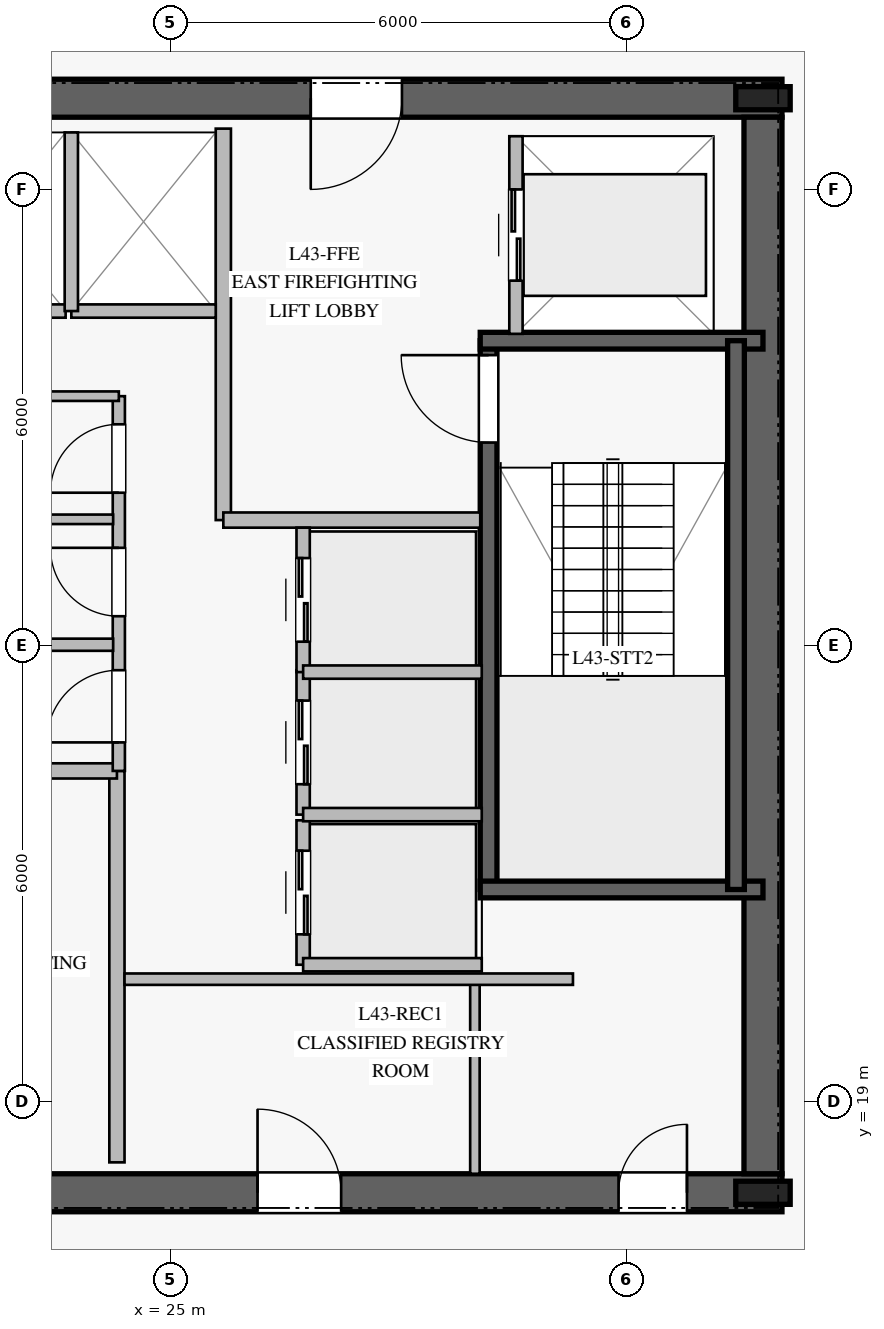
"""IFC4 building model, lengths in metres.
Left out: names, types, materials, properties, quantities, classifications, styles, units other than length and angle.
Written with IfcOpenShell. Run it as: python <this file> out.ifc"""

import sys

from ifc_helpers import new_model, si_unit, direction, frame, frame_2d, origin, origin_2d, place, context, subcontext, project, spatial, rectangle, i_section, extrude, element, fill, save


model = new_model("IFC4")
c1 = context("Model", 3, precision=1e-05, world=origin(), true_north=direction((0.0, 1.0)))
c2 = subcontext(c1, "Body", "Model", "MODEL_VIEW")
j1 = project(units=[si_unit("LENGTHUNIT", "METRE"), si_unit("PLANEANGLEUNIT", "RADIAN")], contexts=[c1])
p1 = place(None, origin())
s1 = spatial("IfcSite", under=j1, at=p1, CompositionType="ELEMENT")
p2 = place(p1, origin())
s2 = spatial("IfcBuilding", under=s1, at=p2, CompositionType="ELEMENT")
p3 = place(p2, frame((0.0, 0.0, 180.8)))
s3 = spatial("IfcBuildingStorey", under=s2, at=p3, CompositionType="ELEMENT", Elevation=180.8)
p4 = place(p3, frame((16.95, 17.8, 0.0), z_axis=(0.0, 0.0, 1.0), x_axis=(1.0, 0.0, 0.0)))
e1 = element("IfcWall", 1, at=p4, inside=s3, PredefinedType="SHEAR", context=c2, shape_type="SweptSolid", body=[
    extrude(rectangle(XDim=16.1, YDim=0.5, at=frame_2d((8.05, 0.0))), origin(), (0.0, 0.0, 1.0), 3.78),
])
p5 = place(p4, frame((5.0, 0.0, 0.0)))
e2 = element("IfcOpeningElement", 2, at=p5, cuts=e1, PredefinedType="OPENING", context=c2, shape_type="SweptSolid", body=[
    extrude(rectangle(XDim=1.2, YDim=2.25, at=frame_2d((0.6, 1.125))), frame((0.0, 0.26, 0.0), z_axis=(0.0, -1.0, 0.0), x_axis=(1.0, 0.0, 0.0)), (0.0, 0.0, 1.0), 0.52),
])
p6 = place(p4, frame((13.95, 0.0, 0.0)))
e3 = element("IfcOpeningElement", 3, at=p6, cuts=e1, PredefinedType="OPENING", context=c2, shape_type="SweptSolid", body=[
    extrude(rectangle(XDim=0.9, YDim=2.1, at=frame_2d((0.45, 1.05))), frame((0.0, 0.26, 0.0), z_axis=(0.0, -1.0, 0.0), x_axis=(1.0, 0.0, 0.0)), (0.0, 0.0, 1.0), 0.52),
])
p7 = place(p4, frame((9.2, 0.0, 0.0)))
e4 = element("IfcOpeningElement", 4, at=p7, cuts=e1, PredefinedType="OPENING", context=c2, shape_type="SweptSolid", body=[
    extrude(rectangle(XDim=1.1, YDim=2.2, at=frame_2d((0.55, 1.1))), frame((0.0, 0.26, 0.0), z_axis=(0.0, -1.0, 0.0), x_axis=(1.0, 0.0, 0.0)), (0.0, 0.0, 1.0), 0.52),
])
p8 = place(p3, frame((33.05, 32.2, 0.0), z_axis=(0.0, 0.0, 1.0), x_axis=(-1.0, 0.0, 0.0)))
e5 = element("IfcWall", 5, at=p8, inside=s3, PredefinedType="SHEAR", context=c2, shape_type="SweptSolid", body=[
    extrude(rectangle(XDim=16.1, YDim=0.5, at=frame_2d((8.05, 0.0))), origin(), (0.0, 0.0, 1.0), 3.78),
])
p9 = place(p8, frame((5.0, 0.0, 0.0)))
e6 = element("IfcOpeningElement", 6, at=p9, cuts=e5, PredefinedType="OPENING", context=c2, shape_type="SweptSolid", body=[
    extrude(rectangle(XDim=1.2, YDim=2.25, at=frame_2d((0.6, 1.125))), frame((0.0, 0.26, 0.0), z_axis=(0.0, -1.0, 0.0), x_axis=(1.0, 0.0, 0.0)), (0.0, 0.0, 1.0), 0.52),
])
p10 = place(p3, frame((32.8, 18.05, 0.0), z_axis=(0.0, 0.0, 1.0), x_axis=(0.0, 1.0, 0.0)))
e7 = element("IfcWall", 7, at=p10, inside=s3, PredefinedType="SHEAR", context=c2, shape_type="SweptSolid", body=[
    extrude(rectangle(XDim=13.9, YDim=0.5, at=frame_2d((6.95, 0.0))), origin(), (0.0, 0.0, 1.0), 3.78),
])
for number, where, z_axis, x_axis in (
    (8, (32.8, 17.8, 0.0), (0.0, 0.0, 1.0), (1.0, 0.0, 0.0)),
    (9, (32.8, 32.2, 0.0), (0.0, 0.0, 1.0), (1.0, 0.0, 0.0)),
):
    element("IfcColumn", number, at=place(p3, frame(where, z_axis=z_axis, x_axis=x_axis)), inside=s3, PredefinedType="COLUMN", context=c2, shape_type="SweptSolid", body=[
        extrude(i_section(OverallWidth=0.304, OverallDepth=0.716, WebThickness=0.021, FlangeThickness=0.04, at=origin_2d()), origin(), (0.0, 0.0, 1.0), 4.0),
    ])
p11 = place(p3, frame((29.19, 21.79, 0.0), z_axis=(0.0, 0.0, 1.0), x_axis=(0.0, 1.0, 0.0)))
e10 = element("IfcWall", 10, at=p11, inside=s3, PredefinedType="SOLIDWALL", context=c2, shape_type="SweptSolid", body=[
    extrude(rectangle(XDim=7.22, YDim=0.22, at=frame_2d((3.61, 0.0))), origin(), (0.0, 0.0, 1.0), 3.78),
])
p12 = place(p11, frame((5.88, 0.0, 0.0)))
e11 = element("IfcOpeningElement", 11, at=p12, cuts=e10, PredefinedType="OPENING", context=c2, shape_type="SweptSolid", body=[
    extrude(rectangle(XDim=1.15, YDim=2.2, at=frame_2d((0.575, 1.1))), frame((0.0, 0.12, 0.0), z_axis=(0.0, -1.0, 0.0), x_axis=(1.0, 0.0, 0.0)), (0.0, 0.0, 1.0), 0.24),
])
for number, where, z_axis, x_axis in (
    (12, (29.08, 21.79, 0.0), (0.0, 0.0, 1.0), (1.0, 0.0, 0.0)),
    (13, (29.08, 29.01, 0.0), (0.0, 0.0, 1.0), (1.0, 0.0, 0.0)),
):
    element("IfcWall", number, at=place(p3, frame(where, z_axis=z_axis, x_axis=x_axis)), inside=s3, PredefinedType="SOLIDWALL", context=c2, shape_type="SweptSolid", body=[
        extrude(rectangle(XDim=3.72, YDim=0.22, at=frame_2d((1.86, 0.0))), origin(), (0.0, 0.0, 1.0), 3.78),
    ])
p13 = place(p3, frame((32.445, 29.01, 0.0), z_axis=(0.0, 0.0, 1.0), x_axis=(0.0, -1.0, 0.0)))
e14 = element("IfcWall", 14, at=p13, inside=s3, PredefinedType="SOLIDWALL", context=c2, shape_type="SweptSolid", body=[
    extrude(rectangle(XDim=7.22, YDim=0.22, at=frame_2d((3.61, 0.0))), origin(), (0.0, 0.0, 1.0), 3.78),
])
p14 = place(p3, frame((24.3, 18.2, 0.0), z_axis=(0.0, 0.0, 1.0), x_axis=(0.0, 1.0, 0.0)))
e15 = element("IfcWall", 15, at=p14, inside=s3, PredefinedType="PARTITIONING", context=c2, shape_type="SweptSolid", body=[
    extrude(rectangle(XDim=5.15, YDim=0.2, at=frame_2d((2.575, 0.0))), origin(), (0.0, 0.0, 1.0), 3.78),
])
p15 = place(p3, frame((20.92, 23.35, 0.0), z_axis=(0.0, 0.0, 1.0), x_axis=(1.0, 0.0, 0.0)))
e16 = element("IfcWall", 16, at=p15, inside=s3, PredefinedType="PARTITIONING", context=c2, shape_type="SweptSolid", body=[
    extrude(rectangle(XDim=3.38, YDim=0.2, at=frame_2d((1.69, 0.0))), origin(), (0.0, 0.0, 1.0), 3.78),
])
p16 = place(p3, frame((25.7, 26.65, 0.0), z_axis=(0.0, 0.0, 1.0), x_axis=(0.0, 1.0, 0.0)))
e17 = element("IfcWall", 17, at=p16, inside=s3, PredefinedType="PARTITIONING", context=c2, shape_type="SweptSolid", body=[
    extrude(rectangle(XDim=5.15, YDim=0.2, at=frame_2d((2.575, 0.0))), origin(), (0.0, 0.0, 1.0), 3.78),
])
p17 = place(p3, frame((25.7, 26.65, 0.0), z_axis=(0.0, 0.0, 1.0), x_axis=(1.0, 0.0, 0.0)))
e18 = element("IfcWall", 18, at=p17, inside=s3, PredefinedType="PARTITIONING", context=c2, shape_type="SweptSolid", body=[
    extrude(rectangle(XDim=3.38, YDim=0.2, at=frame_2d((1.69, 0.0))), origin(), (0.0, 0.0, 1.0), 3.78),
])
p18 = place(p3, frame((24.325, 23.35, 0.0), z_axis=(0.0, 0.0, 1.0), x_axis=(0.0, 1.0, 0.0)))
e19 = element("IfcWall", 19, at=p18, inside=s3, PredefinedType="PLUMBINGWALL", context=c2, shape_type="SweptSolid", body=[
    extrude(rectangle(XDim=4.93, YDim=0.16, at=frame_2d((2.465, 0.0))), origin(), (0.0, 0.0, 1.0), 3.78),
])
p19 = place(p18, frame((0.375, 0.0, 0.0)))
e20 = element("IfcOpeningElement", 20, at=p19, cuts=e19, PredefinedType="OPENING", context=c2, shape_type="SweptSolid", body=[
    extrude(rectangle(XDim=0.95, YDim=2.1, at=frame_2d((0.475, 1.05))), frame((0.0, 0.09, 0.0), z_axis=(0.0, -1.0, 0.0), x_axis=(1.0, 0.0, 0.0)), (0.0, 0.0, 1.0), 0.18),
])
p20 = place(p18, frame((2.035, 0.0, 0.0)))
e21 = element("IfcOpeningElement", 21, at=p20, cuts=e19, PredefinedType="OPENING", context=c2, shape_type="SweptSolid", body=[
    extrude(rectangle(XDim=0.9, YDim=2.1, at=frame_2d((0.45, 1.05))), frame((0.0, 0.09, 0.0), z_axis=(0.0, -1.0, 0.0), x_axis=(1.0, 0.0, 0.0)), (0.0, 0.0, 1.0), 0.18),
])
p21 = place(p18, frame((3.66, 0.0, 0.0)))
e22 = element("IfcOpeningElement", 22, at=p21, cuts=e19, PredefinedType="OPENING", context=c2, shape_type="SweptSolid", body=[
    extrude(rectangle(XDim=0.9, YDim=2.1, at=frame_2d((0.45, 1.05))), frame((0.0, 0.09, 0.0), z_axis=(0.0, -1.0, 0.0), x_axis=(1.0, 0.0, 0.0)), (0.0, 0.0, 1.0), 0.18),
])
p22 = place(p3, frame((20.92, 28.28, 0.0), z_axis=(0.0, 0.0, 1.0), x_axis=(1.0, 0.0, 0.0)))
e23 = element("IfcWall", 23, at=p22, inside=s3, PredefinedType="PARTITIONING", context=c2, shape_type="SweptSolid", body=[
    extrude(rectangle(XDim=3.405, YDim=0.125, at=frame_2d((1.703, 0.0))), origin(), (0.0, 0.0, 1.0), 3.78),
])
p23 = place(p3, frame((29.01, 18.05, 0.0), z_axis=(0.0, 0.0, 1.0), x_axis=(0.0, 1.0, 0.0)))
e24 = element("IfcWall", 24, at=p23, inside=s3, PredefinedType="PARTITIONING", context=c2, shape_type="SweptSolid", body=[
    extrude(rectangle(XDim=2.5, YDim=0.125, at=frame_2d((1.25, 0.0))), origin(), (0.0, 0.0, 1.0), 3.08),
])
p24 = place(p3, frame((20.95, 25.01, 0.0), z_axis=(0.0, 0.0, 1.0), x_axis=(1.0, 0.0, 0.0)))
e25 = element("IfcWall", 25, at=p24, inside=s3, PredefinedType="PLUMBINGWALL", context=c2, shape_type="SweptSolid", body=[
    extrude(rectangle(XDim=3.3, YDim=0.16, at=frame_2d((1.65, 0.0))), origin(), (0.0, 0.0, 1.0), 3.78),
])
p25 = place(p3, frame((20.95, 26.66, 0.0), z_axis=(0.0, 0.0, 1.0), x_axis=(1.0, 0.0, 0.0)))
e26 = element("IfcWall", 26, at=p25, inside=s3, PredefinedType="PARTITIONING", context=c2, shape_type="SweptSolid", body=[
    extrude(rectangle(XDim=3.3, YDim=0.125, at=frame_2d((1.65, 0.0))), origin(), (0.0, 0.0, 1.0), 3.78),
])
p26 = place(p3, frame((24.4, 20.61, 0.0), z_axis=(0.0, 0.0, 1.0), x_axis=(1.0, 0.0, 0.0)))
e27 = element("IfcWall", 27, at=p26, inside=s3, PredefinedType="PARTITIONING", context=c2, shape_type="SweptSolid", body=[
    extrude(rectangle(XDim=5.9, YDim=0.15, at=frame_2d((2.95, 0.0))), origin(), (0.0, 0.0, 1.0), 3.78),
])
p27 = place(p3, frame((21.725, 29.4, 0.0), z_axis=(0.0, 0.0, 1.0), x_axis=(1.0, 0.0, 0.0)))
e28 = element("IfcWall", 28, at=p27, inside=s3, PredefinedType="PARTITIONING", context=c2, shape_type="SweptSolid", body=[
    extrude(rectangle(XDim=1.9, YDim=0.175, at=frame_2d((0.95, 0.0))), origin(), (0.0, 0.0, 1.0), 3.78),
])
p28 = place(p3, frame((23.7, 29.4, 0.0), z_axis=(0.0, 0.0, 1.0), x_axis=(1.0, 0.0, 0.0)))
e29 = element("IfcWall", 29, at=p28, inside=s3, PredefinedType="PARTITIONING", context=c2, shape_type="SweptSolid", body=[
    extrude(rectangle(XDim=1.9, YDim=0.175, at=frame_2d((0.95, 0.0))), origin(), (0.0, 0.0, 1.0), 3.78),
])
p29 = place(p3, frame((23.7, 29.4, 0.0), z_axis=(0.0, 0.0, 1.0), x_axis=(0.0, 1.0, 0.0)))
e30 = element("IfcWall", 30, at=p29, inside=s3, PredefinedType="PARTITIONING", context=c2, shape_type="SweptSolid", body=[
    extrude(rectangle(XDim=2.35, YDim=0.175, at=frame_2d((1.175, 0.0))), origin(), (0.0, 0.0, 1.0), 3.78),
])
p30 = place(p3, frame((26.75, 20.8, 0.0), z_axis=(0.0, 0.0, 1.0), x_axis=(0.0, 1.0, 0.0)))
e31 = element("IfcWall", 31, at=p30, inside=s3, PredefinedType="PARTITIONING", context=c2, shape_type="SweptSolid", body=[
    extrude(rectangle(XDim=1.9, YDim=0.175, at=frame_2d((0.95, 0.0))), origin(), (0.0, 0.0, 1.0), 3.78),
])
p31 = place(p30, frame((0.4, 0.0, 0.0)))
e32 = element("IfcOpeningElement", 32, at=p31, cuts=e31, PredefinedType="OPENING", context=c2, shape_type="SweptSolid", body=[
    extrude(rectangle(XDim=1.1, YDim=2.2, at=frame_2d((0.55, 1.1))), frame((0.0, 0.098, 0.0), z_axis=(0.0, -1.0, 0.0), x_axis=(1.0, 0.0, 0.0)), (0.0, 0.0, 1.0), 0.195),
])
p32 = place(p3, frame((26.75, 20.8, 0.0), z_axis=(0.0, 0.0, 1.0), x_axis=(1.0, 0.0, 0.0)))
e33 = element("IfcWall", 33, at=p32, inside=s3, PredefinedType="PARTITIONING", context=c2, shape_type="SweptSolid", body=[
    extrude(rectangle(XDim=2.35, YDim=0.175, at=frame_2d((1.175, 0.0))), origin(), (0.0, 0.0, 1.0), 3.78),
])
p33 = place(p3, frame((26.75, 22.775, 0.0), z_axis=(0.0, 0.0, 1.0), x_axis=(0.0, 1.0, 0.0)))
e34 = element("IfcWall", 34, at=p33, inside=s3, PredefinedType="PARTITIONING", context=c2, shape_type="SweptSolid", body=[
    extrude(rectangle(XDim=1.9, YDim=0.175, at=frame_2d((0.95, 0.0))), origin(), (0.0, 0.0, 1.0), 3.78),
])
p34 = place(p33, frame((0.4, 0.0, 0.0)))
e35 = element("IfcOpeningElement", 35, at=p34, cuts=e34, PredefinedType="OPENING", context=c2, shape_type="SweptSolid", body=[
    extrude(rectangle(XDim=1.1, YDim=2.2, at=frame_2d((0.55, 1.1))), frame((0.0, 0.098, 0.0), z_axis=(0.0, -1.0, 0.0), x_axis=(1.0, 0.0, 0.0)), (0.0, 0.0, 1.0), 0.195),
])
p35 = place(p3, frame((26.75, 22.775, 0.0), z_axis=(0.0, 0.0, 1.0), x_axis=(1.0, 0.0, 0.0)))
e36 = element("IfcWall", 36, at=p35, inside=s3, PredefinedType="PARTITIONING", context=c2, shape_type="SweptSolid", body=[
    extrude(rectangle(XDim=2.35, YDim=0.175, at=frame_2d((1.175, 0.0))), origin(), (0.0, 0.0, 1.0), 3.78),
])
p36 = place(p3, frame((26.75, 24.65, 0.0), z_axis=(0.0, 0.0, 1.0), x_axis=(0.0, 1.0, 0.0)))
e37 = element("IfcWall", 37, at=p36, inside=s3, PredefinedType="PARTITIONING", context=c2, shape_type="SweptSolid", body=[
    extrude(rectangle(XDim=1.9, YDim=0.175, at=frame_2d((0.95, 0.0))), origin(), (0.0, 0.0, 1.0), 3.78),
])
p37 = place(p36, frame((0.4, 0.0, 0.0)))
e38 = element("IfcOpeningElement", 38, at=p37, cuts=e37, PredefinedType="OPENING", context=c2, shape_type="SweptSolid", body=[
    extrude(rectangle(XDim=1.1, YDim=2.2, at=frame_2d((0.55, 1.1))), frame((0.0, 0.098, 0.0), z_axis=(0.0, -1.0, 0.0), x_axis=(1.0, 0.0, 0.0)), (0.0, 0.0, 1.0), 0.195),
])
p38 = place(p3, frame((26.75, 24.65, 0.0), z_axis=(0.0, 0.0, 1.0), x_axis=(1.0, 0.0, 0.0)))
e39 = element("IfcWall", 39, at=p38, inside=s3, PredefinedType="PARTITIONING", context=c2, shape_type="SweptSolid", body=[
    extrude(rectangle(XDim=2.35, YDim=0.175, at=frame_2d((1.175, 0.0))), origin(), (0.0, 0.0, 1.0), 3.78),
])
p39 = place(p3, frame((29.55, 29.1, 0.0), z_axis=(0.0, 0.0, 1.0), x_axis=(0.0, 1.0, 0.0)))
e40 = element("IfcWall", 40, at=p39, inside=s3, PredefinedType="PARTITIONING", context=c2, shape_type="SweptSolid", body=[
    extrude(rectangle(XDim=2.6, YDim=0.175, at=frame_2d((1.3, 0.0))), origin(), (0.0, 0.0, 1.0), 3.78),
])
p40 = place(p39, frame((0.7, 0.0, 0.0)))
e41 = element("IfcOpeningElement", 41, at=p40, cuts=e40, PredefinedType="OPENING", context=c2, shape_type="SweptSolid", body=[
    extrude(rectangle(XDim=1.2, YDim=2.2, at=frame_2d((0.6, 1.1))), frame((0.0, 0.098, 0.0), z_axis=(0.0, -1.0, 0.0), x_axis=(1.0, 0.0, 0.0)), (0.0, 0.0, 1.0), 0.195),
])
p41 = place(p12, origin())
e42 = element("IfcDoor", 42, at=p41, inside=s3, OperationType="SINGLE_SWING_RIGHT", PredefinedType="DOOR", context=c2, shape_type="SweptSolid", body=[
    extrude(rectangle(XDim=1.15, YDim=2.2, at=frame_2d((0.575, 1.1))), frame((0.0, 0.025, 0.0), z_axis=(0.0, -1.0, 0.0), x_axis=(1.0, 0.0, 0.0)), (0.0, 0.0, 1.0), 0.05),
])
fill(e11, e42)
p42 = place(p9, origin())
e43 = element("IfcDoor", 43, at=p42, inside=s3, OperationType="SINGLE_SWING_RIGHT", PredefinedType="DOOR", context=c2, shape_type="SweptSolid", body=[
    extrude(rectangle(XDim=1.2, YDim=2.25, at=frame_2d((0.6, 1.125))), frame((0.0, 0.025, 0.0), z_axis=(0.0, -1.0, 0.0), x_axis=(1.0, 0.0, 0.0)), (0.0, 0.0, 1.0), 0.05),
])
fill(e6, e43)
p43 = place(p19, origin())
e44 = element("IfcDoor", 44, at=p43, inside=s3, OperationType="SINGLE_SWING_LEFT", PredefinedType="DOOR", context=c2, shape_type="SweptSolid", body=[
    extrude(rectangle(XDim=0.95, YDim=2.1, at=frame_2d((0.475, 1.05))), frame((0.0, 0.025, 0.0), z_axis=(0.0, -1.0, 0.0), x_axis=(1.0, 0.0, 0.0)), (0.0, 0.0, 1.0), 0.05),
])
fill(e20, e44)
p44 = place(p20, origin())
e45 = element("IfcDoor", 45, at=p44, inside=s3, OperationType="SINGLE_SWING_RIGHT", PredefinedType="DOOR", context=c2, shape_type="SweptSolid", body=[
    extrude(rectangle(XDim=0.9, YDim=2.1, at=frame_2d((0.45, 1.05))), frame((0.0, 0.025, 0.0), z_axis=(0.0, -1.0, 0.0), x_axis=(1.0, 0.0, 0.0)), (0.0, 0.0, 1.0), 0.05),
])
fill(e21, e45)
p45 = place(p21, origin())
e46 = element("IfcDoor", 46, at=p45, inside=s3, OperationType="SINGLE_SWING_LEFT", PredefinedType="DOOR", context=c2, shape_type="SweptSolid", body=[
    extrude(rectangle(XDim=0.9, YDim=2.1, at=frame_2d((0.45, 1.05))), frame((0.0, 0.025, 0.0), z_axis=(0.0, -1.0, 0.0), x_axis=(1.0, 0.0, 0.0)), (0.0, 0.0, 1.0), 0.05),
])
fill(e22, e46)
p46 = place(p6, origin())
e47 = element("IfcDoor", 47, at=p46, inside=s3, OperationType="SINGLE_SWING_RIGHT", PredefinedType="DOOR", context=c2, shape_type="SweptSolid", body=[
    extrude(rectangle(XDim=0.9, YDim=2.1, at=frame_2d((0.45, 1.05))), frame((0.0, 0.025, 0.0), z_axis=(0.0, -1.0, 0.0), x_axis=(1.0, 0.0, 0.0)), (0.0, 0.0, 1.0), 0.05),
])
fill(e3, e47)
p47 = place(p7, origin())
e48 = element("IfcDoor", 48, at=p47, inside=s3, OperationType="SINGLE_SWING_LEFT", PredefinedType="DOOR", context=c2, shape_type="SweptSolid", body=[
    extrude(rectangle(XDim=1.1, YDim=2.2, at=frame_2d((0.55, 1.1))), frame((0.0, 0.025, 0.0), z_axis=(0.0, -1.0, 0.0), x_axis=(1.0, 0.0, 0.0)), (0.0, 0.0, 1.0), 0.05),
])
fill(e4, e48)
p48 = place(p31, origin())
e49 = element("IfcDoor", 49, at=p48, inside=s3, OperationType="DOUBLE_DOOR_SLIDING", PredefinedType="DOOR", context=c2, shape_type="SweptSolid", body=[
    extrude(rectangle(XDim=1.1, YDim=2.2, at=frame_2d((0.55, 1.1))), frame((0.0, 0.025, 0.0), z_axis=(0.0, -1.0, 0.0), x_axis=(1.0, 0.0, 0.0)), (0.0, 0.0, 1.0), 0.05),
])
fill(e32, e49)
p49 = place(p34, origin())
e50 = element("IfcDoor", 50, at=p49, inside=s3, OperationType="DOUBLE_DOOR_SLIDING", PredefinedType="DOOR", context=c2, shape_type="SweptSolid", body=[
    extrude(rectangle(XDim=1.1, YDim=2.2, at=frame_2d((0.55, 1.1))), frame((0.0, 0.025, 0.0), z_axis=(0.0, -1.0, 0.0), x_axis=(1.0, 0.0, 0.0)), (0.0, 0.0, 1.0), 0.05),
])
fill(e35, e50)
p50 = place(p37, origin())
e51 = element("IfcDoor", 51, at=p50, inside=s3, OperationType="DOUBLE_DOOR_SLIDING", PredefinedType="DOOR", context=c2, shape_type="SweptSolid", body=[
    extrude(rectangle(XDim=1.1, YDim=2.2, at=frame_2d((0.55, 1.1))), frame((0.0, 0.025, 0.0), z_axis=(0.0, -1.0, 0.0), x_axis=(1.0, 0.0, 0.0)), (0.0, 0.0, 1.0), 0.05),
])
fill(e38, e51)
p51 = place(p40, origin())
e52 = element("IfcDoor", 52, at=p51, inside=s3, OperationType="DOUBLE_DOOR_SLIDING", PredefinedType="DOOR", context=c2, shape_type="SweptSolid", body=[
    extrude(rectangle(XDim=1.2, YDim=2.2, at=frame_2d((0.6, 1.1))), frame((0.0, 0.025, 0.0), z_axis=(0.0, -1.0, 0.0), x_axis=(1.0, 0.0, 0.0)), (0.0, 0.0, 1.0), 0.05),
])
fill(e41, e52)
save(model, sys.argv[1])
